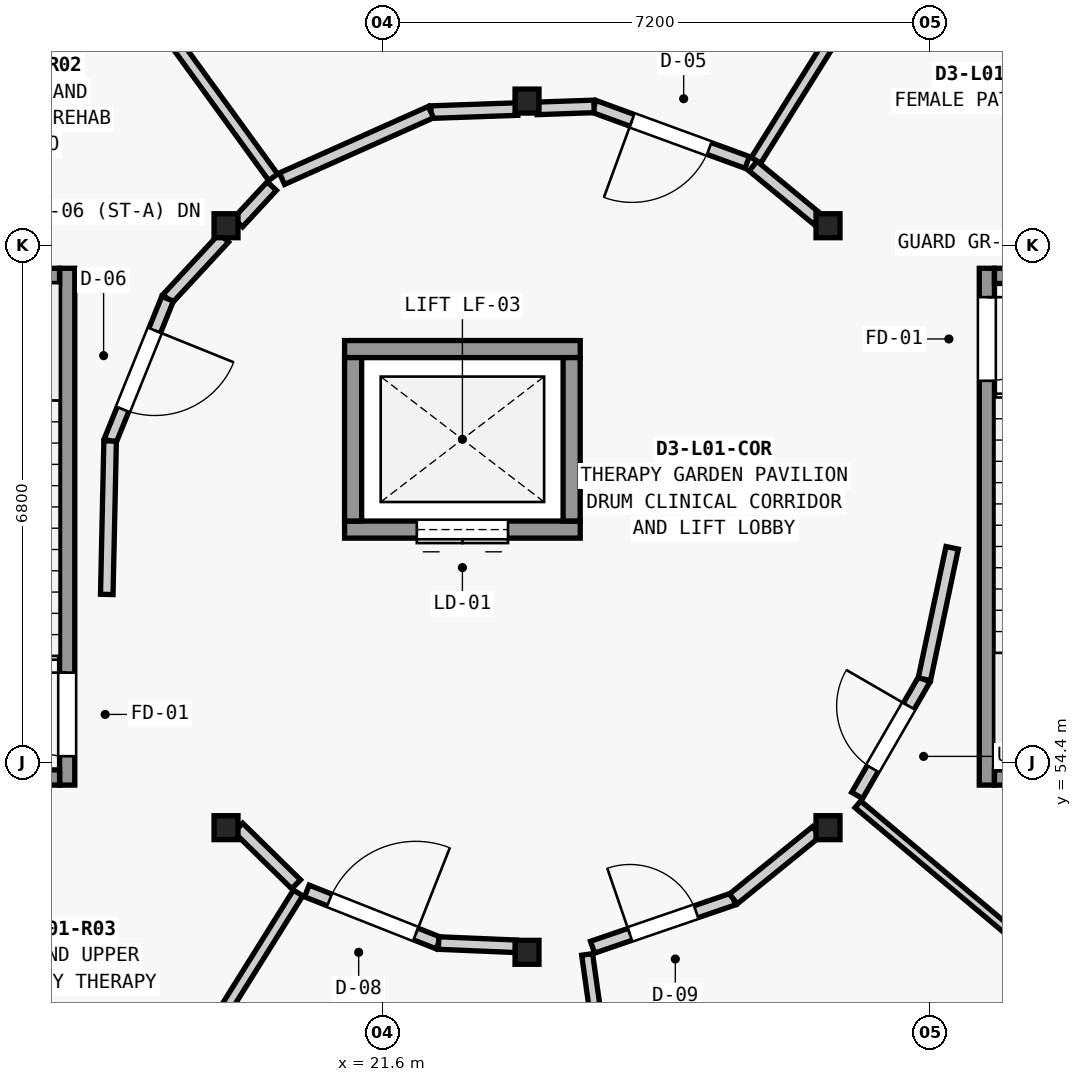
"""IFC4 building model, lengths in metres.
Left out: names, types, materials, properties, quantities, classifications, styles, units other than length and angle.
Written with IfcOpenShell. Run it as: python <this file> out.ifc"""

import sys

from ifc_helpers import new_model, si_unit, direction, frame, frame_2d, origin, origin_2d, place, context, subcontext, project, spatial, rectangle, extrude, element, fill, save


model = new_model("IFC4")
c1 = context("Model", 3, precision=1e-05, world=origin(), true_north=direction((0.0, 1.0)))
c2 = subcontext(c1, "Body", "Model", "MODEL_VIEW")
j1 = project(units=[si_unit("LENGTHUNIT", "METRE"), si_unit("PLANEANGLEUNIT", "RADIAN")], contexts=[c1])
p1 = place(None, origin())
s1 = spatial("IfcSite", under=j1, at=p1, CompositionType="ELEMENT")
p2 = place(p1, origin())
s2 = spatial("IfcBuilding", under=s1, at=p2, CompositionType="ELEMENT")
p3 = place(p2, frame((0.0, 0.0, 4.55)))
s3 = spatial("IfcBuildingStorey", under=s2, at=p3, CompositionType="ELEMENT", Elevation=4.55)
for number, where, z_axis, x_axis in (
    (1, (27.46, 61.46, 0.0), (0.0, 0.0, 1.0), (1.0, 0.0, 0.0)),
    (2, (23.5, 63.1, 0.0), (0.0, 0.0, 1.0), (1.0, 0.0, 0.0)),
    (3, (19.54, 61.46, 0.0), (0.0, 0.0, 1.0), (1.0, 0.0, 0.0)),
    (4, (19.54, 53.54, 0.0), (0.0, 0.0, 1.0), (1.0, 0.0, 0.0)),
    (5, (23.5, 51.9, 0.0), (0.0, 0.0, 1.0), (1.0, 0.0, 0.0)),
    (6, (27.46, 53.54, 0.0), (0.0, 0.0, 1.0), (1.0, 0.0, 0.0)),
):
    element("IfcColumn", number, at=place(p3, frame(where, z_axis=z_axis, x_axis=x_axis)), inside=s3, PredefinedType="COLUMN", context=c2, shape_type="SweptSolid", body=[
        extrude(rectangle(XDim=0.315, YDim=0.315, at=origin_2d()), origin(), (0.0, 0.0, 1.0), 4.2),
    ])
p4 = place(p3, frame((29.55, 60.9, 0.0), z_axis=(0.0, 0.0, 1.0), x_axis=(0.0, -1.0, 0.0)))
e7 = element("IfcWall", 7, at=p4, inside=s3, PredefinedType="SHEAR", context=c2, shape_type="SweptSolid", body=[
    extrude(rectangle(XDim=6.8, YDim=0.2, at=frame_2d((3.4, 0.0))), origin(), (0.0, 0.0, 1.0), 3.96),
])
p5 = place(p4, frame((0.38, 0.0, 0.0)))
e8 = element("IfcOpeningElement", 8, at=p5, cuts=e7, PredefinedType="OPENING", context=c2, shape_type="SweptSolid", body=[
    extrude(rectangle(XDim=1.1, YDim=2.15, at=frame_2d((0.55, 1.075))), frame((0.0, 0.11, 0.0), z_axis=(0.0, -1.0, 0.0), x_axis=(1.0, 0.0, 0.0)), (0.0, 0.0, 1.0), 0.22),
])
for number, where, z_axis, x_axis in (
    (9, (29.65, 60.8, 0.0), (0.0, 0.0, 1.0), (1.0, 0.0, 0.0)),
    (10, (29.65, 54.2, 0.0), (0.0, 0.0, 1.0), (1.0, 0.0, 0.0)),
):
    element("IfcWall", number, at=place(p3, frame(where, z_axis=z_axis, x_axis=x_axis)), inside=s3, PredefinedType="SHEAR", context=c2, shape_type="SweptSolid", body=[
        extrude(rectangle(XDim=2.9, YDim=0.2, at=frame_2d((1.45, 0.0))), origin(), (0.0, 0.0, 1.0), 3.96),
    ])
p6 = place(p3, frame((17.45, 54.1, 0.0), z_axis=(0.0, 0.0, 1.0), x_axis=(0.0, 1.0, 0.0)))
e11 = element("IfcWall", 11, at=p6, inside=s3, PredefinedType="SHEAR", context=c2, shape_type="SweptSolid", body=[
    extrude(rectangle(XDim=6.8, YDim=0.2, at=frame_2d((3.4, 0.0))), origin(), (0.0, 0.0, 1.0), 3.96),
])
p7 = place(p6, frame((0.38, 0.0, 0.0)))
e12 = element("IfcOpeningElement", 12, at=p7, cuts=e11, PredefinedType="OPENING", context=c2, shape_type="SweptSolid", body=[
    extrude(rectangle(XDim=1.1, YDim=2.15, at=frame_2d((0.55, 1.075))), frame((0.0, 0.11, 0.0), z_axis=(0.0, -1.0, 0.0), x_axis=(1.0, 0.0, 0.0)), (0.0, 0.0, 1.0), 0.22),
])
for number, where, z_axis, x_axis in (
    (13, (17.35, 54.2, 0.0), (0.0, 0.0, 1.0), (-1.0, 0.0, 0.0)),
    (14, (17.35, 60.8, 0.0), (0.0, 0.0, 1.0), (-1.0, 0.0, 0.0)),
):
    element("IfcWall", number, at=place(p3, frame(where, z_axis=z_axis, x_axis=x_axis)), inside=s3, PredefinedType="SHEAR", context=c2, shape_type="SweptSolid", body=[
        extrude(rectangle(XDim=2.9, YDim=0.2, at=frame_2d((1.45, 0.0))), origin(), (0.0, 0.0, 1.0), 3.96),
    ])
p8 = place(p3, frame((21.1, 57.462, 0.0), z_axis=(0.0, 0.0, 1.0), x_axis=(1.0, 0.0, 0.0)))
e15 = element("IfcWall", 15, at=p8, inside=s3, PredefinedType="SHEAR", context=c2, shape_type="SweptSolid", body=[
    extrude(rectangle(XDim=3.1, YDim=0.225, at=frame_2d((1.55, 0.0))), origin(), (0.0, 0.0, 1.0), 3.96),
])
p9 = place(p8, frame((0.95, 0.0, 0.0)))
e16 = element("IfcOpeningElement", 16, at=p9, cuts=e15, PredefinedType="OPENING", context=c2, shape_type="SweptSolid", body=[
    extrude(rectangle(XDim=1.2, YDim=2.2, at=frame_2d((0.6, 1.1))), frame((0.0, 0.123, 0.0), z_axis=(0.0, -1.0, 0.0), x_axis=(1.0, 0.0, 0.0)), (0.0, 0.0, 1.0), 0.245),
])
p10 = place(p3, frame((21.1, 59.837, 0.0), z_axis=(0.0, 0.0, 1.0), x_axis=(1.0, 0.0, 0.0)))
e17 = element("IfcWall", 17, at=p10, inside=s3, PredefinedType="SHEAR", context=c2, shape_type="SweptSolid", body=[
    extrude(rectangle(XDim=3.1, YDim=0.225, at=frame_2d((1.55, 0.0))), origin(), (0.0, 0.0, 1.0), 3.96),
])
for number, where, z_axis, x_axis in (
    (18, (21.212, 57.575, 0.0), (0.0, 0.0, 1.0), (0.0, 1.0, 0.0)),
    (19, (24.087, 57.575, 0.0), (0.0, 0.0, 1.0), (0.0, 1.0, 0.0)),
):
    element("IfcWall", number, at=place(p3, frame(where, z_axis=z_axis, x_axis=x_axis)), inside=s3, PredefinedType="SHEAR", context=c2, shape_type="SweptSolid", body=[
        extrude(rectangle(XDim=2.15, YDim=0.225, at=frame_2d((1.075, 0.0))), origin(), (0.0, 0.0, 1.0), 3.96),
    ])
p11 = place(p3, frame((26.512, 62.319, 0.0), z_axis=(0.0, 0.0, 1.0), x_axis=(0.529892832375, 0.848064612042, 0.0)))
e20 = element("IfcWall", 20, at=p11, inside=s3, PredefinedType="PARTITIONING", context=c2, shape_type="SweptSolid", body=[
    extrude(rectangle(XDim=4.55, YDim=0.145, at=frame_2d((2.275, 0.0))), origin(), (0.0, 0.0, 1.0), 3.279),
])
p12 = place(p3, frame((20.16, 62.098, 0.0), z_axis=(0.0, 0.0, 1.0), x_axis=(-0.587873334136, 0.808952991843, 0.0)))
e21 = element("IfcWall", 21, at=p12, inside=s3, PredefinedType="PARTITIONING", context=c2, shape_type="SweptSolid", body=[
    extrude(rectangle(XDim=4.574, YDim=0.145, at=frame_2d((2.287, 0.0))), origin(), (0.0, 0.0, 1.0), 3.279),
])
p13 = place(p3, frame((20.488, 52.681, 0.0), z_axis=(0.0, 0.0, 1.0), x_axis=(-0.529892832375, -0.848064612042, 0.0)))
e22 = element("IfcWall", 22, at=p13, inside=s3, PredefinedType="PARTITIONING", context=c2, shape_type="SweptSolid", body=[
    extrude(rectangle(XDim=4.55, YDim=0.145, at=frame_2d((2.275, 0.0))), origin(), (0.0, 0.0, 1.0), 3.279),
])
p14 = place(p3, frame((24.291, 51.872, 0.0), z_axis=(0.0, 0.0, 1.0), x_axis=(0.139214585132, -0.990262237635, 0.0)))
e23 = element("IfcWall", 23, at=p14, inside=s3, PredefinedType="PARTITIONING", context=c2, shape_type="SweptSolid", body=[
    extrude(rectangle(XDim=4.554, YDim=0.145, at=frame_2d((2.277, 0.0))), origin(), (0.0, 0.0, 1.0), 3.279),
])
p15 = place(p3, frame((27.853, 53.847, 0.0), z_axis=(0.0, 0.0, 1.0), x_axis=(0.766177182771, -0.64262938355, 0.0)))
e24 = element("IfcWall", 24, at=p15, inside=s3, PredefinedType="PARTITIONING", context=c2, shape_type="SweptSolid", body=[
    extrude(rectangle(XDim=4.59, YDim=0.115, at=frame_2d((2.295, 0.0))), origin(), (0.0, 0.0, 1.0), 3.279),
])
p16 = place(p3, frame((26.397, 62.293, 0.0), z_axis=(0.0, 0.0, 1.0), x_axis=(-0.939190865756, 0.34339557027, 0.0)))
e25 = element("IfcWall", 25, at=p16, inside=s3, PredefinedType="PARTITIONING", context=c2, shape_type="SweptSolid", body=[
    extrude(rectangle(XDim=2.146, YDim=0.165, at=frame_2d((1.073, 0.0))), origin(), (0.0, 0.0, 1.0), 3.279),
])
p17 = place(p16, frame((0.533, 0.0, 0.0)))
e26 = element("IfcOpeningElement", 26, at=p17, cuts=e25, PredefinedType="OPENING", context=c2, shape_type="SweptSolid", body=[
    extrude(rectangle(XDim=1.08, YDim=2.16, at=frame_2d((0.54, 1.08))), frame((0.0, 0.093, 0.0), z_axis=(0.0, -1.0, 0.0), x_axis=(1.0, 0.0, 0.0)), (0.0, 0.0, 1.0), 0.185),
])
p18 = place(p3, frame((24.381, 63.03, 0.0), z_axis=(0.0, 0.0, 1.0), x_axis=(-0.999393961522, -0.034809620405, 0.0)))
e27 = element("IfcWall", 27, at=p18, inside=s3, PredefinedType="PARTITIONING", context=c2, shape_type="SweptSolid", body=[
    extrude(rectangle(XDim=0.75, YDim=0.165, at=frame_2d((0.375, 0.0))), origin(), (0.0, 0.0, 1.0), 3.279),
])
p19 = place(p3, frame((23.376, 62.995, 0.0), z_axis=(0.0, 0.0, 1.0), x_axis=(-0.999383677093, -0.035103645972, 0.0)))
e28 = element("IfcWall", 28, at=p19, inside=s3, PredefinedType="PARTITIONING", context=c2, shape_type="SweptSolid", body=[
    extrude(rectangle(XDim=1.141, YDim=0.165, at=frame_2d((0.57, 0.0))), origin(), (0.0, 0.0, 1.0), 3.279),
])
p20 = place(p3, frame((22.236, 62.955, 0.0), z_axis=(0.0, 0.0, 1.0), x_axis=(-0.912984379162, -0.407994513941, 0.0)))
e29 = element("IfcWall", 29, at=p20, inside=s3, PredefinedType="PARTITIONING", context=c2, shape_type="SweptSolid", body=[
    extrude(rectangle(XDim=2.147, YDim=0.165, at=frame_2d((1.073, 0.0))), origin(), (0.0, 0.0, 1.0), 3.279),
])
p21 = place(p3, frame((20.142, 61.981, 0.0), z_axis=(0.0, 0.0, 1.0), x_axis=(-0.679935917373, -0.73327153788, 0.0)))
e30 = element("IfcWall", 30, at=p21, inside=s3, PredefinedType="PARTITIONING", context=c2, shape_type="SweptSolid", body=[
    extrude(rectangle(XDim=0.655, YDim=0.165, at=frame_2d((0.327, 0.0))), origin(), (0.0, 0.0, 1.0), 3.279),
])
p22 = place(p3, frame((19.512, 61.3, 0.0), z_axis=(0.0, 0.0, 1.0), x_axis=(-0.679051024612, -0.734091074713, 0.0)))
e31 = element("IfcWall", 31, at=p22, inside=s3, PredefinedType="PARTITIONING", context=c2, shape_type="SweptSolid", body=[
    extrude(rectangle(XDim=1.091, YDim=0.165, at=frame_2d((0.545, 0.0))), origin(), (0.0, 0.0, 1.0), 3.279),
])
p23 = place(p3, frame((18.771, 60.499, 0.0), z_axis=(0.0, 0.0, 1.0), x_axis=(-0.374663065009, -0.927161036562, 0.0)))
e32 = element("IfcWall", 32, at=p23, inside=s3, PredefinedType="PARTITIONING", context=c2, shape_type="SweptSolid", body=[
    extrude(rectangle(XDim=2.018, YDim=0.165, at=frame_2d((1.009, 0.0))), origin(), (0.0, 0.0, 1.0), 3.279),
])
p24 = place(p23, frame((0.449, 0.0, 0.0)))
e33 = element("IfcOpeningElement", 33, at=p24, cuts=e32, PredefinedType="OPENING", context=c2, shape_type="SweptSolid", body=[
    extrude(rectangle(XDim=1.12, YDim=2.16, at=frame_2d((0.56, 1.08))), frame((0.0, 0.093, 0.0), z_axis=(0.0, -1.0, 0.0), x_axis=(1.0, 0.0, 0.0)), (0.0, 0.0, 1.0), 0.185),
])
p25 = place(p3, frame((18.015, 58.628, 0.0), z_axis=(0.0, 0.0, 1.0), x_axis=(-0.021760263499, -0.999763217433, 0.0)))
e34 = element("IfcWall", 34, at=p25, inside=s3, PredefinedType="PARTITIONING", context=c2, shape_type="SweptSolid", body=[
    extrude(rectangle(XDim=2.02, YDim=0.165, at=frame_2d((1.01, 0.0))), origin(), (0.0, 0.0, 1.0), 3.279),
])
p26 = place(p3, frame((19.702, 53.54, 0.0), z_axis=(0.0, 0.0, 1.0), x_axis=(0.714068342312, -0.700075997666, 0.0)))
e35 = element("IfcWall", 35, at=p26, inside=s3, PredefinedType="PARTITIONING", context=c2, shape_type="SweptSolid", body=[
    extrude(rectangle(XDim=1.064, YDim=0.165, at=frame_2d((0.532, 0.0))), origin(), (0.0, 0.0, 1.0), 3.279),
])
p27 = place(p3, frame((20.603, 52.707, 0.0), z_axis=(0.0, 0.0, 1.0), x_axis=(0.929969054131, -0.367637808663, 0.0)))
e36 = element("IfcWall", 36, at=p27, inside=s3, PredefinedType="PARTITIONING", context=c2, shape_type="SweptSolid", body=[
    extrude(rectangle(XDim=1.864, YDim=0.165, at=frame_2d((0.932, 0.0))), origin(), (0.0, 0.0, 1.0), 3.279),
])
p28 = place(p27, frame((0.321, 0.0, 0.0)))
e37 = element("IfcOpeningElement", 37, at=p28, cuts=e36, PredefinedType="OPENING", context=c2, shape_type="SweptSolid", body=[
    extrude(rectangle(XDim=1.22, YDim=2.18, at=frame_2d((0.61, 1.09))), frame((0.0, 0.093, 0.0), z_axis=(0.0, -1.0, 0.0), x_axis=(1.0, 0.0, 0.0)), (0.0, 0.0, 1.0), 0.185),
])
p29 = place(p3, frame((22.336, 52.022, 0.0), z_axis=(0.0, 0.0, 1.0), x_axis=(0.999117282865, -0.042007797846, 0.0)))
e38 = element("IfcWall", 38, at=p29, inside=s3, PredefinedType="PARTITIONING", context=c2, shape_type="SweptSolid", body=[
    extrude(rectangle(XDim=1.023, YDim=0.165, at=frame_2d((0.511, 0.0))), origin(), (0.0, 0.0, 1.0), 3.279),
])
p30 = place(p3, frame((24.362, 51.967, 0.0), z_axis=(0.0, 0.0, 1.0), x_axis=(0.94599509797, 0.32418092883, 0.0)))
e39 = element("IfcWall", 39, at=p30, inside=s3, PredefinedType="PARTITIONING", context=c2, shape_type="SweptSolid", body=[
    extrude(rectangle(XDim=1.959, YDim=0.165, at=frame_2d((0.979, 0.0))), origin(), (0.0, 0.0, 1.0), 3.279),
])
p31 = place(p30, frame((0.52, 0.0, 0.0)))
e40 = element("IfcOpeningElement", 40, at=p31, cuts=e39, PredefinedType="OPENING", context=c2, shape_type="SweptSolid", body=[
    extrude(rectangle(XDim=0.92, YDim=2.24, at=frame_2d((0.46, 1.12))), frame((0.0, 0.093, 0.0), z_axis=(0.0, -1.0, 0.0), x_axis=(1.0, 0.0, 0.0)), (0.0, 0.0, 1.0), 0.185),
])
p32 = place(p3, frame((26.215, 52.602, 0.0), z_axis=(0.0, 0.0, 1.0), x_axis=(0.77622027024, 0.630461808572, 0.0)))
e41 = element("IfcWall", 41, at=p32, inside=s3, PredefinedType="PARTITIONING", context=c2, shape_type="SweptSolid", body=[
    extrude(rectangle(XDim=1.405, YDim=0.165, at=frame_2d((0.703, 0.0))), origin(), (0.0, 0.0, 1.0), 3.279),
])
p33 = place(p3, frame((27.843, 53.964, 0.0), z_axis=(0.0, 0.0, 1.0), x_axis=(0.500998134269, 0.865448363254, 0.0)))
e42 = element("IfcWall", 42, at=p33, inside=s3, PredefinedType="PARTITIONING", context=c2, shape_type="SweptSolid", body=[
    extrude(rectangle(XDim=1.767, YDim=0.165, at=frame_2d((0.883, 0.0))), origin(), (0.0, 0.0, 1.0), 3.279),
])
p34 = place(p33, frame((0.408, 0.0, 0.0)))
e43 = element("IfcOpeningElement", 43, at=p34, cuts=e42, PredefinedType="OPENING", context=c2, shape_type="SweptSolid", body=[
    extrude(rectangle(XDim=0.95, YDim=2.16, at=frame_2d((0.475, 1.08))), frame((0.0, 0.093, 0.0), z_axis=(0.0, -1.0, 0.0), x_axis=(1.0, 0.0, 0.0)), (0.0, 0.0, 1.0), 0.185),
])
p35 = place(p3, frame((28.728, 55.493, 0.0), z_axis=(0.0, 0.0, 1.0), x_axis=(0.206546592113, 0.978436766116, 0.0)))
e44 = element("IfcWall", 44, at=p35, inside=s3, PredefinedType="PARTITIONING", context=c2, shape_type="SweptSolid", body=[
    extrude(rectangle(XDim=1.767, YDim=0.165, at=frame_2d((0.884, 0.0))), origin(), (0.0, 0.0, 1.0), 3.279),
])
p36 = place(p3, frame((27.322, 61.545, 0.0), z_axis=(0.0, 0.0, 1.0), x_axis=(-0.771070753982, 0.636749473775, 0.0)))
e45 = element("IfcWall", 45, at=p36, inside=s3, PredefinedType="PARTITIONING", context=c2, shape_type="SweptSolid", body=[
    extrude(rectangle(XDim=1.1, YDim=0.165, at=frame_2d((0.55, 0.0))), origin(), (0.0, 0.0, 1.0), 3.279),
])
p37 = place(p5, origin())
e46 = element("IfcDoor", 46, at=p37, inside=s3, OperationType="SINGLE_SWING_LEFT", PredefinedType="DOOR", context=c2, shape_type="SweptSolid", body=[
    extrude(rectangle(XDim=1.1, YDim=2.15, at=frame_2d((0.55, 1.075))), frame((0.0, 0.025, 0.0), z_axis=(0.0, -1.0, 0.0), x_axis=(1.0, 0.0, 0.0)), (0.0, 0.0, 1.0), 0.05),
])
fill(e8, e46)
p38 = place(p7, origin())
e47 = element("IfcDoor", 47, at=p38, inside=s3, OperationType="SINGLE_SWING_RIGHT", PredefinedType="DOOR", context=c2, shape_type="SweptSolid", body=[
    extrude(rectangle(XDim=1.1, YDim=2.15, at=frame_2d((0.55, 1.075))), frame((0.0, 0.025, 0.0), z_axis=(0.0, -1.0, 0.0), x_axis=(1.0, 0.0, 0.0)), (0.0, 0.0, 1.0), 0.05),
])
fill(e12, e47)
p39 = place(p9, origin())
e48 = element("IfcDoor", 48, at=p39, inside=s3, OperationType="DOUBLE_DOOR_SLIDING", PredefinedType="DOOR", context=c2, shape_type="SweptSolid", body=[
    extrude(rectangle(XDim=1.2, YDim=2.2, at=frame_2d((0.6, 1.1))), frame((0.0, 0.025, 0.0), z_axis=(0.0, -1.0, 0.0), x_axis=(1.0, 0.0, 0.0)), (0.0, 0.0, 1.0), 0.05),
])
fill(e16, e48)
p40 = place(p17, origin())
e49 = element("IfcDoor", 49, at=p40, inside=s3, OperationType="SINGLE_SWING_RIGHT", PredefinedType="DOOR", context=c2, shape_type="SweptSolid", body=[
    extrude(rectangle(XDim=1.08, YDim=2.16, at=frame_2d((0.54, 1.08))), frame((0.0, 0.025, 0.0), z_axis=(0.0, -1.0, 0.0), x_axis=(1.0, 0.0, 0.0)), (0.0, 0.0, 1.0), 0.05),
])
fill(e26, e49)
p41 = place(p24, origin())
e50 = element("IfcDoor", 50, at=p41, inside=s3, OperationType="SINGLE_SWING_LEFT", PredefinedType="DOOR", context=c2, shape_type="SweptSolid", body=[
    extrude(rectangle(XDim=1.12, YDim=2.16, at=frame_2d((0.56, 1.08))), frame((0.0, 0.025, 0.0), z_axis=(0.0, -1.0, 0.0), x_axis=(1.0, 0.0, 0.0)), (0.0, 0.0, 1.0), 0.05),
])
fill(e33, e50)
p42 = place(p28, origin())
e51 = element("IfcDoor", 51, at=p42, inside=s3, OperationType="SINGLE_SWING_RIGHT", PredefinedType="DOOR", context=c2, shape_type="SweptSolid", body=[
    extrude(rectangle(XDim=1.22, YDim=2.18, at=frame_2d((0.61, 1.09))), frame((0.0, 0.025, 0.0), z_axis=(0.0, -1.0, 0.0), x_axis=(1.0, 0.0, 0.0)), (0.0, 0.0, 1.0), 0.05),
])
fill(e37, e51)
p43 = place(p31, origin())
e52 = element("IfcDoor", 52, at=p43, inside=s3, OperationType="SINGLE_SWING_LEFT", PredefinedType="DOOR", context=c2, shape_type="SweptSolid", body=[
    extrude(rectangle(XDim=0.92, YDim=2.24, at=frame_2d((0.46, 1.12))), frame((0.0, 0.025, 0.0), z_axis=(0.0, -1.0, 0.0), x_axis=(1.0, 0.0, 0.0)), (0.0, 0.0, 1.0), 0.05),
])
fill(e40, e52)
p44 = place(p34, origin())
e53 = element("IfcDoor", 53, at=p44, inside=s3, OperationType="SINGLE_SWING_RIGHT", PredefinedType="DOOR", context=c2, shape_type="SweptSolid", body=[
    extrude(rectangle(XDim=0.95, YDim=2.16, at=frame_2d((0.475, 1.08))), frame((0.0, 0.025, 0.0), z_axis=(0.0, -1.0, 0.0), x_axis=(1.0, 0.0, 0.0)), (0.0, 0.0, 1.0), 0.05),
])
fill(e43, e53)
save(model, sys.argv[1])
